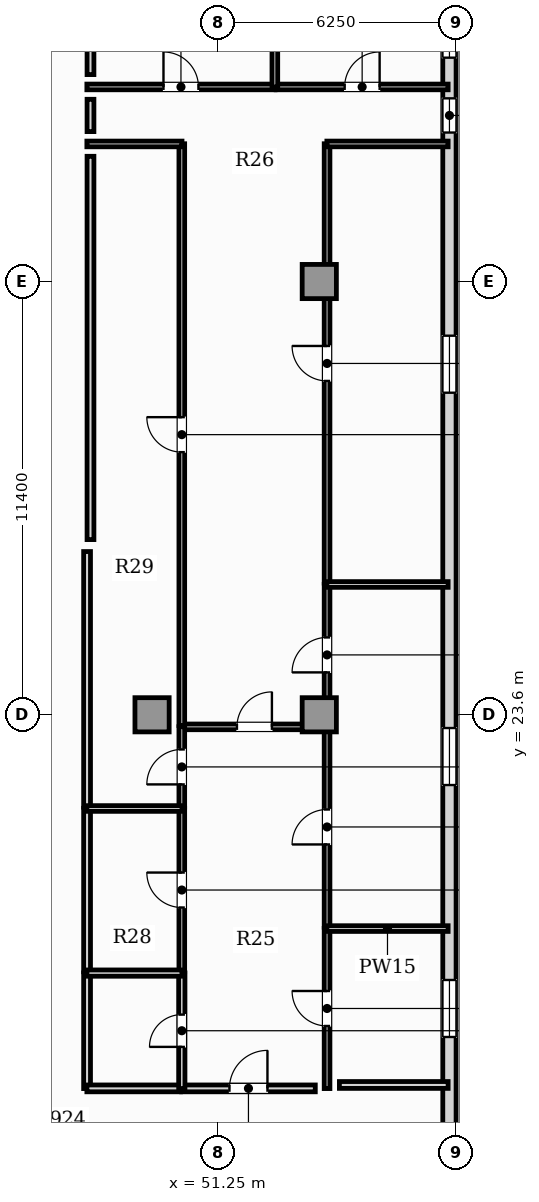
"""IFC4 building model, lengths in metres.
Left out: names, types, materials, properties, quantities, classifications, styles, units other than length and angle.
Written with IfcOpenShell. Run it as: python <this file> out.ifc"""

import sys

from ifc_helpers import new_model, si_unit, direction, frame, frame_2d, origin, origin_2d, place, context, subcontext, project, spatial, rectangle, extrude, element, fill, save


model = new_model("IFC4")
c1 = context("Model", 3, precision=1e-05, world=origin(), true_north=direction((0.0, 1.0)))
c2 = subcontext(c1, "Body", "Model", "MODEL_VIEW")
j1 = project(units=[si_unit("LENGTHUNIT", "METRE"), si_unit("PLANEANGLEUNIT", "RADIAN")], contexts=[c1])
p1 = place(None, origin())
s1 = spatial("IfcSite", under=j1, at=p1, CompositionType="ELEMENT")
p2 = place(p1, origin())
s2 = spatial("IfcBuilding", under=s1, at=p2, CompositionType="ELEMENT")
p3 = place(p2, frame((0.0, 0.0, 81.05)))
s3 = spatial("IfcBuildingStorey", under=s2, at=p3, CompositionType="ELEMENT", Elevation=81.05)
for number, where, z_axis, x_axis in (
    (1, (49.5, 23.6, 0.0), (0.0, 0.0, 1.0), (1.0, 0.0, 0.0)),
    (2, (53.9, 23.6, 0.0), (0.0, 0.0, 1.0), (1.0, 0.0, 0.0)),
    (3, (53.9, 35.0, 0.0), (0.0, 0.0, 1.0), (1.0, 0.0, 0.0)),
):
    element("IfcColumn", number, at=place(p3, frame(where, z_axis=z_axis, x_axis=x_axis)), inside=s3, PredefinedType="COLUMN", context=c2, shape_type="SweptSolid", body=[
        extrude(rectangle(XDim=0.9, YDim=0.9, at=origin_2d()), origin(), (0.0, 0.0, 1.0), 3.85),
    ])
p4 = place(p3, frame((57.325, 3.24, 0.0), z_axis=(0.0, 0.0, 1.0), x_axis=(0.0, 1.0, 0.0)))
e4 = element("IfcWall", 4, at=p4, inside=s3, PredefinedType="SOLIDWALL", context=c2, shape_type="SweptSolid", body=[
    extrude(rectangle(XDim=39.92, YDim=0.35, at=frame_2d((19.96, 0.0))), origin(), (0.0, 0.0, 1.0), 3.6),
])
p5 = place(p4, frame((35.68, 0.0, 0.95)))
e5 = element("IfcOpeningElement", 5, at=p5, cuts=e4, PredefinedType="OPENING", context=c2, shape_type="SweptSolid", body=[
    extrude(rectangle(XDim=0.9, YDim=1.5, at=frame_2d((0.45, 0.75))), frame((0.0, 0.185, 0.0), z_axis=(0.0, -1.0, 0.0), x_axis=(1.0, 0.0, 0.0)), (0.0, 0.0, 1.0), 0.37),
])
p6 = place(p4, frame((11.882, 0.0, 0.9)))
e6 = element("IfcOpeningElement", 6, at=p6, cuts=e4, PredefinedType="OPENING", context=c2, shape_type="SweptSolid", body=[
    extrude(rectangle(XDim=1.5, YDim=1.95, at=frame_2d((0.75, 0.975))), frame((0.0, 0.185, 0.0), z_axis=(0.0, -1.0, 0.0), x_axis=(1.0, 0.0, 0.0)), (0.0, 0.0, 1.0), 0.37),
])
p7 = place(p4, frame((18.512, 0.0, 0.9)))
e7 = element("IfcOpeningElement", 7, at=p7, cuts=e4, PredefinedType="OPENING", context=c2, shape_type="SweptSolid", body=[
    extrude(rectangle(XDim=1.5, YDim=1.95, at=frame_2d((0.75, 0.975))), frame((0.0, 0.185, 0.0), z_axis=(0.0, -1.0, 0.0), x_axis=(1.0, 0.0, 0.0)), (0.0, 0.0, 1.0), 0.37),
])
p8 = place(p4, frame((28.834, 0.0, 0.9)))
e8 = element("IfcOpeningElement", 8, at=p8, cuts=e4, PredefinedType="OPENING", context=c2, shape_type="SweptSolid", body=[
    extrude(rectangle(XDim=1.5, YDim=1.95, at=frame_2d((0.75, 0.975))), frame((0.0, 0.185, 0.0), z_axis=(0.0, -1.0, 0.0), x_axis=(1.0, 0.0, 0.0)), (0.0, 0.0, 1.0), 0.37),
])
p9 = place(p4, frame((37.65, 0.0, 0.9)))
e9 = element("IfcOpeningElement", 9, at=p9, cuts=e4, PredefinedType="OPENING", context=c2, shape_type="SweptSolid", body=[
    extrude(rectangle(XDim=1.5, YDim=1.95, at=frame_2d((0.75, 0.975))), frame((0.0, 0.185, 0.0), z_axis=(0.0, -1.0, 0.0), x_axis=(1.0, 0.0, 0.0)), (0.0, 0.0, 1.0), 0.37),
])
p10 = place(p3, frame((50.278, 13.77, 0.0), z_axis=(0.0, 0.0, 1.0), x_axis=(1.0, 0.0, 0.0)))
e10 = element("IfcWall", 10, at=p10, inside=s3, PredefinedType="PARTITIONING", context=c2, shape_type="SweptSolid", body=[
    extrude(rectangle(XDim=3.517, YDim=0.18, at=frame_2d((1.759, 0.0))), origin(), (0.0, 0.0, 1.0), 3.6),
])
p11 = place(p10, frame((1.259, 0.0, 0.0)))
e11 = element("IfcOpeningElement", 11, at=p11, cuts=e10, PredefinedType="OPENING", context=c2, shape_type="SweptSolid", body=[
    extrude(rectangle(XDim=1.0, YDim=2.15, at=frame_2d((0.5, 1.075))), frame((0.0, 0.1, 0.0), z_axis=(0.0, -1.0, 0.0), x_axis=(1.0, 0.0, 0.0)), (0.0, 0.0, 1.0), 0.2),
])
p12 = place(p3, frame((47.79, 13.765, 0.0), z_axis=(0.0, 0.0, 1.0), x_axis=(0.0, 1.0, 0.0)))
e12 = element("IfcWall", 12, at=p12, inside=s3, PredefinedType="PARTITIONING", context=c2, shape_type="SweptSolid", body=[
    extrude(rectangle(XDim=3.044, YDim=0.18, at=frame_2d((1.522, 0.0))), origin(), (0.0, 0.0, 1.0), 3.6),
])
p13 = place(p3, frame((47.785, 13.77, 0.0), z_axis=(0.0, 0.0, 1.0), x_axis=(1.0, 0.0, 0.0)))
e13 = element("IfcWall", 13, at=p13, inside=s3, PredefinedType="PARTITIONING", context=c2, shape_type="SweptSolid", body=[
    extrude(rectangle(XDim=2.463, YDim=0.18, at=frame_2d((1.231, 0.0))), origin(), (0.0, 0.0, 1.0), 3.6),
])
p14 = place(p3, frame((47.79, 16.839, 0.0), z_axis=(0.0, 0.0, 1.0), x_axis=(0.0, 1.0, 0.0)))
e14 = element("IfcWall", 14, at=p14, inside=s3, PredefinedType="PARTITIONING", context=c2, shape_type="SweptSolid", body=[
    extrude(rectangle(XDim=4.301, YDim=0.18, at=frame_2d((2.15, 0.0))), origin(), (0.0, 0.0, 1.0), 3.6),
])
p15 = place(p3, frame((47.79, 21.169, 0.0), z_axis=(0.0, 0.0, 1.0), x_axis=(0.0, 1.0, 0.0)))
e15 = element("IfcWall", 15, at=p15, inside=s3, PredefinedType="PARTITIONING", context=c2, shape_type="SweptSolid", body=[
    extrude(rectangle(XDim=6.726, YDim=0.18, at=frame_2d((3.363, 0.0))), origin(), (0.0, 0.0, 1.0), 3.6),
])
p16 = place(p3, frame((50.278, 23.282, 0.0), z_axis=(0.0, 0.0, 1.0), x_axis=(1.0, 0.0, 0.0)))
e16 = element("IfcWall", 16, at=p16, inside=s3, PredefinedType="PARTITIONING", context=c2, shape_type="SweptSolid", body=[
    extrude(rectangle(XDim=3.832, YDim=0.15, at=frame_2d((1.916, 0.0))), origin(), (0.0, 0.0, 1.0), 3.6),
])
p17 = place(p16, frame((1.456, 0.0, 0.0)))
e17 = element("IfcOpeningElement", 17, at=p17, cuts=e16, PredefinedType="OPENING", context=c2, shape_type="SweptSolid", body=[
    extrude(rectangle(XDim=0.92, YDim=2.1, at=frame_2d((0.46, 1.05))), frame((0.0, 0.085, 0.0), z_axis=(0.0, -1.0, 0.0), x_axis=(1.0, 0.0, 0.0)), (0.0, 0.0, 1.0), 0.17),
])
p18 = place(p3, frame((50.283, 13.765, 0.0), z_axis=(0.0, 0.0, 1.0), x_axis=(0.0, 1.0, 0.0)))
e18 = element("IfcWall", 18, at=p18, inside=s3, PredefinedType="PLUMBINGWALL", context=c2, shape_type="SweptSolid", body=[
    extrude(rectangle(XDim=3.044, YDim=0.165, at=frame_2d((1.522, 0.0))), origin(), (0.0, 0.0, 1.0), 3.6),
])
p19 = place(p18, frame((1.097, 0.0, 0.0)))
e19 = element("IfcOpeningElement", 19, at=p19, cuts=e18, PredefinedType="OPENING", context=c2, shape_type="SweptSolid", body=[
    extrude(rectangle(XDim=0.85, YDim=2.1, at=frame_2d((0.425, 1.05))), frame((0.0, 0.093, 0.0), z_axis=(0.0, -1.0, 0.0), x_axis=(1.0, 0.0, 0.0)), (0.0, 0.0, 1.0), 0.185),
])
p20 = place(p3, frame((50.283, 16.839, 0.0), z_axis=(0.0, 0.0, 1.0), x_axis=(0.0, 1.0, 0.0)))
e20 = element("IfcWall", 20, at=p20, inside=s3, PredefinedType="PARTITIONING", context=c2, shape_type="SweptSolid", body=[
    extrude(rectangle(XDim=4.301, YDim=0.15, at=frame_2d((2.15, 0.0))), origin(), (0.0, 0.0, 1.0), 3.6),
])
p21 = place(p20, frame((1.69, 0.0, 0.0)))
e21 = element("IfcOpeningElement", 21, at=p21, cuts=e20, PredefinedType="OPENING", context=c2, shape_type="SweptSolid", body=[
    extrude(rectangle(XDim=0.92, YDim=2.1, at=frame_2d((0.46, 1.05))), frame((0.0, 0.085, 0.0), z_axis=(0.0, -1.0, 0.0), x_axis=(1.0, 0.0, 0.0)), (0.0, 0.0, 1.0), 0.17),
])
p22 = place(p3, frame((50.283, 21.169, 0.0), z_axis=(0.0, 0.0, 1.0), x_axis=(0.0, 1.0, 0.0)))
e22 = element("IfcWall", 22, at=p22, inside=s3, PredefinedType="PARTITIONING", context=c2, shape_type="SweptSolid", body=[
    extrude(rectangle(XDim=2.118, YDim=0.15, at=frame_2d((1.059, 0.0))), origin(), (0.0, 0.0, 1.0), 3.6),
])
p23 = place(p22, frame((0.599, 0.0, 0.0)))
e23 = element("IfcOpeningElement", 23, at=p23, cuts=e22, PredefinedType="OPENING", context=c2, shape_type="SweptSolid", body=[
    extrude(rectangle(XDim=0.92, YDim=2.1, at=frame_2d((0.46, 1.05))), frame((0.0, 0.085, 0.0), z_axis=(0.0, -1.0, 0.0), x_axis=(1.0, 0.0, 0.0)), (0.0, 0.0, 1.0), 0.17),
])
p24 = place(p3, frame((54.105, 13.765, 0.0), z_axis=(0.0, 0.0, 1.0), x_axis=(0.0, 1.0, 0.0)))
e24 = element("IfcWall", 24, at=p24, inside=s3, PredefinedType="PARTITIONING", context=c2, shape_type="SweptSolid", body=[
    extrude(rectangle(XDim=4.215, YDim=0.15, at=frame_2d((2.107, 0.0))), origin(), (0.0, 0.0, 1.0), 3.055),
])
p25 = place(p24, frame((1.647, 0.0, 0.0)))
e25 = element("IfcOpeningElement", 25, at=p25, cuts=e24, PredefinedType="OPENING", context=c2, shape_type="SweptSolid", body=[
    extrude(rectangle(XDim=0.92, YDim=2.1, at=frame_2d((0.46, 1.05))), frame((0.0, 0.085, 0.0), z_axis=(0.0, -1.0, 0.0), x_axis=(1.0, 0.0, 0.0)), (0.0, 0.0, 1.0), 0.17),
])
p26 = place(p3, frame((54.105, 18.01, 0.0), z_axis=(0.0, 0.0, 1.0), x_axis=(0.0, 1.0, 0.0)))
e26 = element("IfcWall", 26, at=p26, inside=s3, PredefinedType="PARTITIONING", context=c2, shape_type="SweptSolid", body=[
    extrude(rectangle(XDim=5.277, YDim=0.15, at=frame_2d((2.639, 0.0))), origin(), (0.0, 0.0, 1.0), 3.055),
])
p27 = place(p26, frame((2.179, 0.0, 0.0)))
e27 = element("IfcOpeningElement", 27, at=p27, cuts=e26, PredefinedType="OPENING", context=c2, shape_type="SweptSolid", body=[
    extrude(rectangle(XDim=0.92, YDim=2.1, at=frame_2d((0.46, 1.05))), frame((0.0, 0.085, 0.0), z_axis=(0.0, -1.0, 0.0), x_axis=(1.0, 0.0, 0.0)), (0.0, 0.0, 1.0), 0.17),
])
p28 = place(p3, frame((50.283, 23.317, 0.0), z_axis=(0.0, 0.0, 1.0), x_axis=(0.0, 1.0, 0.0)))
e28 = element("IfcWall", 28, at=p28, inside=s3, PredefinedType="PARTITIONING", context=c2, shape_type="SweptSolid", body=[
    extrude(rectangle(XDim=15.308, YDim=0.15, at=frame_2d((7.654, 0.0))), origin(), (0.0, 0.0, 1.0), 3.6),
])
p29 = place(p28, frame((7.194, 0.0, 0.0)))
e29 = element("IfcOpeningElement", 29, at=p29, cuts=e28, PredefinedType="OPENING", context=c2, shape_type="SweptSolid", body=[
    extrude(rectangle(XDim=0.92, YDim=2.1, at=frame_2d((0.46, 1.05))), frame((0.0, 0.085, 0.0), z_axis=(0.0, -1.0, 0.0), x_axis=(1.0, 0.0, 0.0)), (0.0, 0.0, 1.0), 0.17),
])
p30 = place(p3, frame((47.785, 38.62, 0.0), z_axis=(0.0, 0.0, 1.0), x_axis=(1.0, 0.0, 0.0)))
e30 = element("IfcWall", 30, at=p30, inside=s3, PredefinedType="PARTITIONING", context=c2, shape_type="SweptSolid", body=[
    extrude(rectangle(XDim=2.503, YDim=0.15, at=frame_2d((1.251, 0.0))), origin(), (0.0, 0.0, 1.0), 3.6),
])
p31 = place(p3, frame((54.105, 23.317, 0.0), z_axis=(0.0, 0.0, 1.0), x_axis=(0.0, 1.0, 0.0)))
e31 = element("IfcWall", 31, at=p31, inside=s3, PredefinedType="PARTITIONING", context=c2, shape_type="SweptSolid", body=[
    extrude(rectangle(XDim=3.717, YDim=0.15, at=frame_2d((1.858, 0.0))), origin(), (0.0, 0.0, 1.0), 3.055),
])
p32 = place(p31, frame((1.398, 0.0, 0.0)))
e32 = element("IfcOpeningElement", 32, at=p32, cuts=e31, PredefinedType="OPENING", context=c2, shape_type="SweptSolid", body=[
    extrude(rectangle(XDim=0.92, YDim=2.1, at=frame_2d((0.46, 1.05))), frame((0.0, 0.085, 0.0), z_axis=(0.0, -1.0, 0.0), x_axis=(1.0, 0.0, 0.0)), (0.0, 0.0, 1.0), 0.17),
])
p33 = place(p3, frame((54.105, 27.064, 0.0), z_axis=(0.0, 0.0, 1.0), x_axis=(0.0, 1.0, 0.0)))
e33 = element("IfcWall", 33, at=p33, inside=s3, PredefinedType="PARTITIONING", context=c2, shape_type="SweptSolid", body=[
    extrude(rectangle(XDim=11.561, YDim=0.15, at=frame_2d((5.781, 0.0))), origin(), (0.0, 0.0, 1.0), 3.055),
])
p34 = place(p33, frame((5.321, 0.0, 0.0)))
e34 = element("IfcOpeningElement", 34, at=p34, cuts=e33, PredefinedType="OPENING", context=c2, shape_type="SweptSolid", body=[
    extrude(rectangle(XDim=0.92, YDim=2.1, at=frame_2d((0.46, 1.05))), frame((0.0, 0.085, 0.0), z_axis=(0.0, -1.0, 0.0), x_axis=(1.0, 0.0, 0.0)), (0.0, 0.0, 1.0), 0.17),
])
p35 = place(p3, frame((54.1, 38.62, 0.0), z_axis=(0.0, 0.0, 1.0), x_axis=(1.0, 0.0, 0.0)))
e35 = element("IfcWall", 35, at=p35, inside=s3, PredefinedType="PARTITIONING", context=c2, shape_type="SweptSolid", body=[
    extrude(rectangle(XDim=3.19, YDim=0.15, at=frame_2d((1.595, 0.0))), origin(), (0.0, 0.0, 1.0), 3.6),
])
p36 = place(p3, frame((47.785, 40.12, 0.0), z_axis=(0.0, 0.0, 1.0), x_axis=(1.0, 0.0, 0.0)))
e36 = element("IfcWall", 36, at=p36, inside=s3, PredefinedType="PARTITIONING", context=c2, shape_type="SweptSolid", body=[
    extrude(rectangle(XDim=4.951, YDim=0.15, at=frame_2d((2.476, 0.0))), origin(), (0.0, 0.0, 1.0), 3.6),
])
p37 = place(p36, frame((2.016, 0.0, 0.0)))
e37 = element("IfcOpeningElement", 37, at=p37, cuts=e36, PredefinedType="OPENING", context=c2, shape_type="SweptSolid", body=[
    extrude(rectangle(XDim=0.92, YDim=2.1, at=frame_2d((0.46, 1.05))), frame((0.0, 0.085, 0.0), z_axis=(0.0, -1.0, 0.0), x_axis=(1.0, 0.0, 0.0)), (0.0, 0.0, 1.0), 0.17),
])
p38 = place(p3, frame((52.766, 40.12, 0.0), z_axis=(0.0, 0.0, 1.0), x_axis=(1.0, 0.0, 0.0)))
e38 = element("IfcWall", 38, at=p38, inside=s3, PredefinedType="PARTITIONING", context=c2, shape_type="SweptSolid", body=[
    extrude(rectangle(XDim=4.524, YDim=0.15, at=frame_2d((2.262, 0.0))), origin(), (0.0, 0.0, 1.0), 3.6),
])
p39 = place(p38, frame((1.802, 0.0, 0.0)))
e39 = element("IfcOpeningElement", 39, at=p39, cuts=e38, PredefinedType="OPENING", context=c2, shape_type="SweptSolid", body=[
    extrude(rectangle(XDim=0.92, YDim=2.1, at=frame_2d((0.46, 1.05))), frame((0.0, 0.085, 0.0), z_axis=(0.0, -1.0, 0.0), x_axis=(1.0, 0.0, 0.0)), (0.0, 0.0, 1.0), 0.17),
])
p40 = place(p3, frame((47.785, 16.804, 0.0), z_axis=(0.0, 0.0, 1.0), x_axis=(1.0, 0.0, 0.0)))
e40 = element("IfcWall", 40, at=p40, inside=s3, PredefinedType="PLUMBINGWALL", context=c2, shape_type="SweptSolid", body=[
    extrude(rectangle(XDim=2.503, YDim=0.165, at=frame_2d((1.251, 0.0))), origin(), (0.0, 0.0, 1.0), 3.6),
])
p41 = place(p3, frame((47.785, 21.135, 0.0), z_axis=(0.0, 0.0, 1.0), x_axis=(1.0, 0.0, 0.0)))
e41 = element("IfcWall", 41, at=p41, inside=s3, PredefinedType="PARTITIONING", context=c2, shape_type="SweptSolid", body=[
    extrude(rectangle(XDim=2.503, YDim=0.15, at=frame_2d((1.251, 0.0))), origin(), (0.0, 0.0, 1.0), 3.6),
])
for number, where, z_axis, x_axis in (
    (42, (54.1, 17.975, 0.0), (0.0, 0.0, 1.0), (1.0, 0.0, 0.0)),
    (43, (54.1, 27.029, 0.0), (0.0, 0.0, 1.0), (1.0, 0.0, 0.0)),
):
    element("IfcWall", number, at=place(p3, frame(where, z_axis=z_axis, x_axis=x_axis)), inside=s3, PredefinedType="PARTITIONING", context=c2, shape_type="SweptSolid", body=[
        extrude(rectangle(XDim=3.19, YDim=0.15, at=frame_2d((1.595, 0.0))), origin(), (0.0, 0.0, 1.0), 3.6),
    ])
p42 = place(p3, frame((52.731, 40.115, 0.0), z_axis=(0.0, 0.0, 1.0), x_axis=(0.0, 1.0, 0.0)))
e44 = element("IfcWall", 44, at=p42, inside=s3, PredefinedType="PARTITIONING", context=c2, shape_type="SweptSolid", body=[
    extrude(rectangle(XDim=6.075, YDim=0.15, at=frame_2d((3.038, 0.0))), origin(), (0.0, 0.0, 1.0), 3.6),
])
p43 = place(p3, frame((47.88, 38.945, 0.0), z_axis=(0.0, 0.0, 1.0), x_axis=(0.0, 1.0, 0.0)))
e45 = element("IfcWall", 45, at=p43, inside=s3, PredefinedType="PARTITIONING", context=c2, shape_type="SweptSolid", body=[
    extrude(rectangle(XDim=0.85, YDim=0.18, at=frame_2d((0.425, 0.0))), origin(), (0.0, 0.0, 1.0), 3.6),
])
p44 = place(p3, frame((47.88, 28.21, 0.0), z_axis=(0.0, 0.0, 1.0), x_axis=(0.0, 1.0, 0.0)))
e46 = element("IfcWall", 46, at=p44, inside=s3, PredefinedType="PARTITIONING", context=c2, shape_type="SweptSolid", body=[
    extrude(rectangle(XDim=10.085, YDim=0.18, at=frame_2d((5.042, 0.0))), origin(), (0.0, 0.0, 1.0), 3.6),
])
p45 = place(p3, frame((57.29, 13.86, 0.0), z_axis=(0.0, 0.0, 1.0), x_axis=(-1.0, 0.0, 0.0)))
e47 = element("IfcWall", 47, at=p45, inside=s3, PredefinedType="PARTITIONING", context=c2, shape_type="SweptSolid", body=[
    extrude(rectangle(XDim=2.86, YDim=0.18, at=frame_2d((1.43, 0.0))), origin(), (0.0, 0.0, 1.0), 3.6),
])
p46 = place(p3, frame((47.88, 40.445, 0.0), z_axis=(0.0, 0.0, 1.0), x_axis=(0.0, 1.0, 0.0)))
e48 = element("IfcWall", 48, at=p46, inside=s3, PredefinedType="PARTITIONING", context=c2, shape_type="SweptSolid", body=[
    extrude(rectangle(XDim=5.745, YDim=0.18, at=frame_2d((2.873, 0.0))), origin(), (0.0, 0.0, 1.0), 3.6),
])
p47 = place(p5, origin())
e49 = element("IfcWindow", 49, at=p47, inside=s3, PartitioningType="SINGLE_PANEL", PredefinedType="WINDOW", context=c2, shape_type="SweptSolid", body=[
    extrude(rectangle(XDim=0.9, YDim=1.5, at=frame_2d((0.45, 0.75))), frame((0.0, 0.03, 0.0), z_axis=(0.0, -1.0, 0.0), x_axis=(1.0, 0.0, 0.0)), (0.0, 0.0, 1.0), 0.06),
])
fill(e5, e49)
p48 = place(p6, origin())
e50 = element("IfcWindow", 50, at=p48, inside=s3, PartitioningType="SINGLE_PANEL", PredefinedType="WINDOW", context=c2, shape_type="SweptSolid", body=[
    extrude(rectangle(XDim=1.5, YDim=1.95, at=frame_2d((0.75, 0.975))), frame((0.0, 0.03, 0.0), z_axis=(0.0, -1.0, 0.0), x_axis=(1.0, 0.0, 0.0)), (0.0, 0.0, 1.0), 0.06),
])
fill(e6, e50)
p49 = place(p7, origin())
e51 = element("IfcWindow", 51, at=p49, inside=s3, PartitioningType="SINGLE_PANEL", PredefinedType="WINDOW", context=c2, shape_type="SweptSolid", body=[
    extrude(rectangle(XDim=1.5, YDim=1.95, at=frame_2d((0.75, 0.975))), frame((0.0, 0.03, 0.0), z_axis=(0.0, -1.0, 0.0), x_axis=(1.0, 0.0, 0.0)), (0.0, 0.0, 1.0), 0.06),
])
fill(e7, e51)
p50 = place(p8, origin())
e52 = element("IfcWindow", 52, at=p50, inside=s3, PartitioningType="SINGLE_PANEL", PredefinedType="WINDOW", context=c2, shape_type="SweptSolid", body=[
    extrude(rectangle(XDim=1.5, YDim=1.95, at=frame_2d((0.75, 0.975))), frame((0.0, 0.03, 0.0), z_axis=(0.0, -1.0, 0.0), x_axis=(1.0, 0.0, 0.0)), (0.0, 0.0, 1.0), 0.06),
])
fill(e8, e52)
p51 = place(p9, origin())
e53 = element("IfcWindow", 53, at=p51, inside=s3, PartitioningType="SINGLE_PANEL", PredefinedType="WINDOW", context=c2, shape_type="SweptSolid", body=[
    extrude(rectangle(XDim=1.5, YDim=1.95, at=frame_2d((0.75, 0.975))), frame((0.0, 0.03, 0.0), z_axis=(0.0, -1.0, 0.0), x_axis=(1.0, 0.0, 0.0)), (0.0, 0.0, 1.0), 0.06),
])
fill(e9, e53)
p52 = place(p11, origin())
e54 = element("IfcDoor", 54, at=p52, inside=s3, OperationType="SINGLE_SWING_RIGHT", PredefinedType="DOOR", context=c2, shape_type="SweptSolid", body=[
    extrude(rectangle(XDim=1.0, YDim=2.15, at=frame_2d((0.5, 1.075))), frame((0.0, 0.025, 0.0), z_axis=(0.0, -1.0, 0.0), x_axis=(1.0, 0.0, 0.0)), (0.0, 0.0, 1.0), 0.05),
])
fill(e11, e54)
p53 = place(p17, origin())
e55 = element("IfcDoor", 55, at=p53, inside=s3, OperationType="SINGLE_SWING_RIGHT", PredefinedType="DOOR", context=c2, shape_type="SweptSolid", body=[
    extrude(rectangle(XDim=0.92, YDim=2.1, at=frame_2d((0.46, 1.05))), frame((0.0, 0.025, 0.0), z_axis=(0.0, -1.0, 0.0), x_axis=(1.0, 0.0, 0.0)), (0.0, 0.0, 1.0), 0.05),
])
fill(e17, e55)
p54 = place(p19, origin())
e56 = element("IfcDoor", 56, at=p54, inside=s3, OperationType="SINGLE_SWING_LEFT", PredefinedType="DOOR", context=c2, shape_type="SweptSolid", body=[
    extrude(rectangle(XDim=0.85, YDim=2.1, at=frame_2d((0.425, 1.05))), frame((0.0, 0.025, 0.0), z_axis=(0.0, -1.0, 0.0), x_axis=(1.0, 0.0, 0.0)), (0.0, 0.0, 1.0), 0.05),
])
fill(e19, e56)
p55 = place(p21, origin())
e57 = element("IfcDoor", 57, at=p55, inside=s3, OperationType="SINGLE_SWING_RIGHT", PredefinedType="DOOR", context=c2, shape_type="SweptSolid", body=[
    extrude(rectangle(XDim=0.92, YDim=2.1, at=frame_2d((0.46, 1.05))), frame((0.0, 0.025, 0.0), z_axis=(0.0, -1.0, 0.0), x_axis=(1.0, 0.0, 0.0)), (0.0, 0.0, 1.0), 0.05),
])
fill(e21, e57)
p56 = place(p23, origin())
e58 = element("IfcDoor", 58, at=p56, inside=s3, OperationType="SINGLE_SWING_LEFT", PredefinedType="DOOR", context=c2, shape_type="SweptSolid", body=[
    extrude(rectangle(XDim=0.92, YDim=2.1, at=frame_2d((0.46, 1.05))), frame((0.0, 0.025, 0.0), z_axis=(0.0, -1.0, 0.0), x_axis=(1.0, 0.0, 0.0)), (0.0, 0.0, 1.0), 0.05),
])
fill(e23, e58)
p57 = place(p25, origin())
e59 = element("IfcDoor", 59, at=p57, inside=s3, OperationType="SINGLE_SWING_RIGHT", PredefinedType="DOOR", context=c2, shape_type="SweptSolid", body=[
    extrude(rectangle(XDim=0.92, YDim=2.1, at=frame_2d((0.46, 1.05))), frame((0.0, 0.025, 0.0), z_axis=(0.0, -1.0, 0.0), x_axis=(1.0, 0.0, 0.0)), (0.0, 0.0, 1.0), 0.05),
])
fill(e25, e59)
p58 = place(p27, origin())
e60 = element("IfcDoor", 60, at=p58, inside=s3, OperationType="SINGLE_SWING_LEFT", PredefinedType="DOOR", context=c2, shape_type="SweptSolid", body=[
    extrude(rectangle(XDim=0.92, YDim=2.1, at=frame_2d((0.46, 1.05))), frame((0.0, 0.025, 0.0), z_axis=(0.0, -1.0, 0.0), x_axis=(1.0, 0.0, 0.0)), (0.0, 0.0, 1.0), 0.05),
])
fill(e27, e60)
p59 = place(p29, origin())
e61 = element("IfcDoor", 61, at=p59, inside=s3, OperationType="SINGLE_SWING_RIGHT", PredefinedType="DOOR", context=c2, shape_type="SweptSolid", body=[
    extrude(rectangle(XDim=0.92, YDim=2.1, at=frame_2d((0.46, 1.05))), frame((0.0, 0.025, 0.0), z_axis=(0.0, -1.0, 0.0), x_axis=(1.0, 0.0, 0.0)), (0.0, 0.0, 1.0), 0.05),
])
fill(e29, e61)
p60 = place(p32, origin())
e62 = element("IfcDoor", 62, at=p60, inside=s3, OperationType="SINGLE_SWING_LEFT", PredefinedType="DOOR", context=c2, shape_type="SweptSolid", body=[
    extrude(rectangle(XDim=0.92, YDim=2.1, at=frame_2d((0.46, 1.05))), frame((0.0, 0.025, 0.0), z_axis=(0.0, -1.0, 0.0), x_axis=(1.0, 0.0, 0.0)), (0.0, 0.0, 1.0), 0.05),
])
fill(e32, e62)
p61 = place(p34, origin())
e63 = element("IfcDoor", 63, at=p61, inside=s3, OperationType="SINGLE_SWING_RIGHT", PredefinedType="DOOR", context=c2, shape_type="SweptSolid", body=[
    extrude(rectangle(XDim=0.92, YDim=2.1, at=frame_2d((0.46, 1.05))), frame((0.0, 0.025, 0.0), z_axis=(0.0, -1.0, 0.0), x_axis=(1.0, 0.0, 0.0)), (0.0, 0.0, 1.0), 0.05),
])
fill(e34, e63)
p62 = place(p37, origin())
e64 = element("IfcDoor", 64, at=p62, inside=s3, OperationType="SINGLE_SWING_LEFT", PredefinedType="DOOR", context=c2, shape_type="SweptSolid", body=[
    extrude(rectangle(XDim=0.92, YDim=2.1, at=frame_2d((0.46, 1.05))), frame((0.0, 0.025, 0.0), z_axis=(0.0, -1.0, 0.0), x_axis=(1.0, 0.0, 0.0)), (0.0, 0.0, 1.0), 0.05),
])
fill(e37, e64)
p63 = place(p39, origin())
e65 = element("IfcDoor", 65, at=p63, inside=s3, OperationType="SINGLE_SWING_RIGHT", PredefinedType="DOOR", context=c2, shape_type="SweptSolid", body=[
    extrude(rectangle(XDim=0.92, YDim=2.1, at=frame_2d((0.46, 1.05))), frame((0.0, 0.025, 0.0), z_axis=(0.0, -1.0, 0.0), x_axis=(1.0, 0.0, 0.0)), (0.0, 0.0, 1.0), 0.05),
])
fill(e39, e65)
save(model, sys.argv[1])
